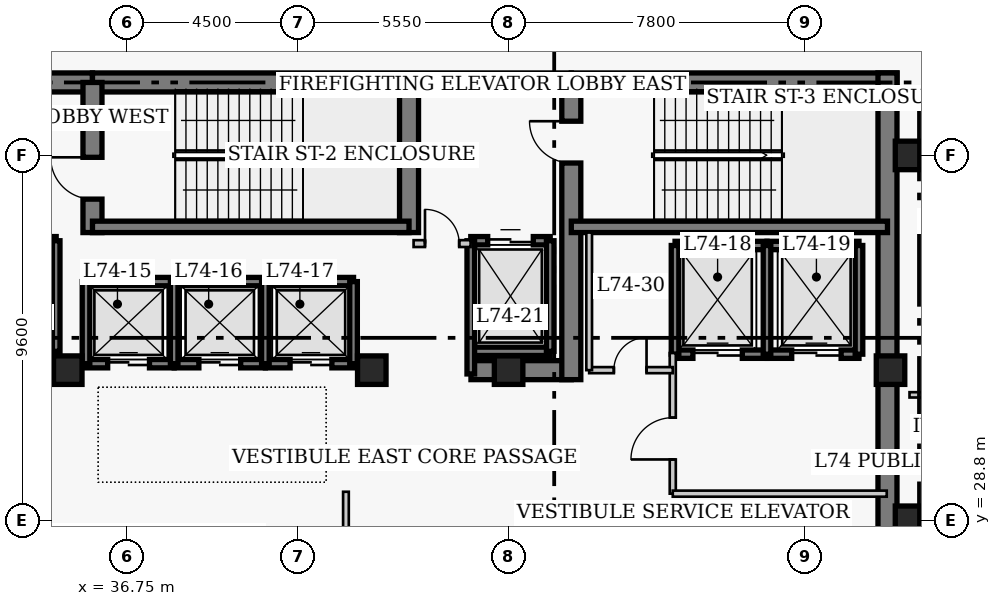
"""IFC4 building model, lengths in metres.
Left out: names, types, materials, properties, quantities, classifications, styles, units other than length and angle.
Written with IfcOpenShell. Run it as: python <this file> out.ifc"""

import sys

from ifc_helpers import new_model, si_unit, direction, frame, frame_2d, origin, origin_2d, place, context, subcontext, project, spatial, rectangle, extrude, element, fill, save


model = new_model("IFC4")
c1 = context("Model", 3, precision=1e-05, world=origin(), true_north=direction((0.0, 1.0)))
c2 = subcontext(c1, "Body", "Model", "MODEL_VIEW")
j1 = project(units=[si_unit("LENGTHUNIT", "METRE"), si_unit("PLANEANGLEUNIT", "RADIAN")], contexts=[c1])
p1 = place(None, origin())
s1 = spatial("IfcSite", under=j1, at=p1, CompositionType="ELEMENT")
p2 = place(p1, origin())
s2 = spatial("IfcBuilding", under=s1, at=p2, CompositionType="ELEMENT")
p3 = place(p2, frame((0.0, 0.0, 297.4)))
s3 = spatial("IfcBuildingStorey", under=s2, at=p3, CompositionType="ELEMENT", Elevation=297.4)
p4 = place(p3, frame((21.65, 40.32, 0.0), z_axis=(0.0, 0.0, 1.0), x_axis=(1.0, 0.0, 0.0)))
e1 = element("IfcWall", 1, at=p4, inside=s3, PredefinedType="SHEAR", context=c2, shape_type="SweptSolid", body=[
    extrude(rectangle(XDim=14.2, YDim=0.5, at=frame_2d((7.1, 0.0))), origin(), (0.0, 0.0, 1.0), 4.6),
])
p5 = place(p3, frame((35.85, 40.32, 0.0), z_axis=(0.0, 0.0, 1.0), x_axis=(1.0, 0.0, 0.0)))
e2 = element("IfcWall", 2, at=p5, inside=s3, PredefinedType="SHEAR", context=c2, shape_type="SweptSolid", body=[
    extrude(rectangle(XDim=12.6, YDim=0.5, at=frame_2d((6.3, 0.0))), origin(), (0.0, 0.0, 1.0), 4.6),
])
p6 = place(p3, frame((48.45, 40.32, 0.0), z_axis=(0.0, 0.0, 1.0), x_axis=(1.0, 0.0, 0.0)))
e3 = element("IfcWall", 3, at=p6, inside=s3, PredefinedType="SHEAR", context=c2, shape_type="SweptSolid", body=[
    extrude(rectangle(XDim=8.57, YDim=0.5, at=frame_2d((4.285, 0.0))), origin(), (0.0, 0.0, 1.0), 4.6),
])
p7 = place(p3, frame((56.77, 27.05, 0.0), z_axis=(0.0, 0.0, 1.0), x_axis=(0.0, 1.0, 0.0)))
e4 = element("IfcWall", 4, at=p7, inside=s3, PredefinedType="SHEAR", context=c2, shape_type="SweptSolid", body=[
    extrude(rectangle(XDim=13.52, YDim=0.5, at=frame_2d((6.76, 0.0))), origin(), (0.0, 0.0, 1.0), 4.6),
])
p8 = place(p3, frame((45.81, 32.75, 0.0), z_axis=(0.0, 0.0, 1.0), x_axis=(1.0, 0.0, 0.0)))
e5 = element("IfcWall", 5, at=p8, inside=s3, PredefinedType="SHEAR", context=c2, shape_type="SweptSolid", body=[
    extrude(rectangle(XDim=2.64, YDim=0.5, at=frame_2d((1.32, 0.0))), origin(), (0.0, 0.0, 1.0), 4.6),
])
p9 = place(p3, frame((35.85, 36.37, 0.0), z_axis=(0.0, 0.0, 1.0), x_axis=(0.0, 1.0, 0.0)))
e6 = element("IfcWall", 6, at=p9, inside=s3, PredefinedType="SHEAR", context=c2, shape_type="SweptSolid", body=[
    extrude(rectangle(XDim=3.95, YDim=0.5, at=frame_2d((1.975, 0.0))), origin(), (0.0, 0.0, 1.0), 4.6),
])
p10 = place(p9, frame((0.88, 0.0, 0.0)))
e7 = element("IfcOpeningElement", 7, at=p10, cuts=e6, PredefinedType="OPENING", context=c2, shape_type="SweptSolid", body=[
    extrude(rectangle(XDim=1.1, YDim=2.15, at=frame_2d((0.55, 1.075))), frame((0.0, 0.26, 0.0), z_axis=(0.0, -1.0, 0.0), x_axis=(1.0, 0.0, 0.0)), (0.0, 0.0, 1.0), 0.52),
])
p11 = place(p3, frame((44.18, 36.37, 0.0), z_axis=(0.0, 0.0, 1.0), x_axis=(0.0, 1.0, 0.0)))
e8 = element("IfcWall", 8, at=p11, inside=s3, PredefinedType="SHEAR", context=c2, shape_type="SweptSolid", body=[
    extrude(rectangle(XDim=3.95, YDim=0.5, at=frame_2d((1.975, 0.0))), origin(), (0.0, 0.0, 1.0), 4.6),
])
p12 = place(p3, frame((48.45, 32.5, 0.0), z_axis=(0.0, 0.0, 1.0), x_axis=(0.0, 1.0, 0.0)))
e9 = element("IfcWall", 9, at=p12, inside=s3, PredefinedType="SHEAR", context=c2, shape_type="SweptSolid", body=[
    extrude(rectangle(XDim=7.82, YDim=0.5, at=frame_2d((3.91, 0.0))), origin(), (0.0, 0.0, 1.0), 4.6),
])
p13 = place(p12, frame((5.7, 0.0, 0.0)))
e10 = element("IfcOpeningElement", 10, at=p13, cuts=e9, PredefinedType="OPENING", context=c2, shape_type="SweptSolid", body=[
    extrude(rectangle(XDim=1.1, YDim=2.15, at=frame_2d((0.55, 1.075))), frame((0.0, 0.26, 0.0), z_axis=(0.0, -1.0, 0.0), x_axis=(1.0, 0.0, 0.0)), (0.0, 0.0, 1.0), 0.52),
])
p14 = place(p3, frame((35.85, 36.52, 0.0), z_axis=(0.0, 0.0, 1.0), x_axis=(1.0, 0.0, 0.0)))
e11 = element("IfcWall", 11, at=p14, inside=s3, PredefinedType="SHEAR", context=c2, shape_type="SweptSolid", body=[
    extrude(rectangle(XDim=8.33, YDim=0.3, at=frame_2d((4.165, 0.0))), origin(), (0.0, 0.0, 1.0), 4.6),
])
p15 = place(p3, frame((48.45, 36.52, 0.0), z_axis=(0.0, 0.0, 1.0), x_axis=(1.0, 0.0, 0.0)))
e12 = element("IfcWall", 12, at=p15, inside=s3, PredefinedType="SHEAR", context=c2, shape_type="SweptSolid", body=[
    extrude(rectangle(XDim=8.32, YDim=0.3, at=frame_2d((4.16, 0.0))), origin(), (0.0, 0.0, 1.0), 4.6),
])
for number, where, z_axis, x_axis in (
    (13, (57.35, 28.8, 0.0), (0.0, 0.0, 1.0), (1.0, 0.0, 0.0)),
    (14, (57.35, 38.4, 0.0), (0.0, 0.0, 1.0), (1.0, 0.0, 0.0)),
    (15, (35.2, 32.75, 0.0), (0.0, 0.0, 1.0), (1.0, 0.0, 0.0)),
    (16, (43.2, 32.75, 0.0), (0.0, 0.0, 1.0), (1.0, 0.0, 0.0)),
    (17, (46.8, 32.75, 0.0), (0.0, 0.0, 1.0), (1.0, 0.0, 0.0)),
    (18, (56.85, 32.75, 0.0), (0.0, 0.0, 1.0), (1.0, 0.0, 0.0)),
):
    element("IfcColumn", number, at=place(p3, frame(where, z_axis=z_axis, x_axis=x_axis)), inside=s3, PredefinedType="COLUMN", context=c2, shape_type="SweptSolid", body=[
        extrude(rectangle(XDim=0.75, YDim=0.75, at=origin_2d()), origin(), (0.0, 0.0, 1.0), 4.6),
    ])
p16 = place(p3, frame((35.68, 35.08, 0.0), z_axis=(0.0, 0.0, 1.0), x_axis=(1.0, 0.0, 0.0)))
e19 = element("IfcWall", 19, at=p16, inside=s3, PredefinedType="SHEAR", context=c2, shape_type="SweptSolid", body=[
    extrude(rectangle(XDim=2.32, YDim=0.22, at=frame_2d((1.16, 0.0))), origin(), (0.0, 0.0, 1.0), 4.6),
])
p17 = place(p3, frame((35.68, 32.92, 0.0), z_axis=(0.0, 0.0, 1.0), x_axis=(1.0, 0.0, 0.0)))
e20 = element("IfcWall", 20, at=p17, inside=s3, PredefinedType="SHEAR", context=c2, shape_type="SweptSolid", body=[
    extrude(rectangle(XDim=2.32, YDim=0.22, at=frame_2d((1.16, 0.0))), origin(), (0.0, 0.0, 1.0), 4.6),
])
p18 = place(p17, frame((0.57, 0.0, 0.0)))
e21 = element("IfcOpeningElement", 21, at=p18, cuts=e20, PredefinedType="OPENING", context=c2, shape_type="SweptSolid", body=[
    extrude(rectangle(XDim=1.1, YDim=2.15, at=frame_2d((0.55, 1.075))), frame((0.0, 0.12, 0.0), z_axis=(0.0, -1.0, 0.0), x_axis=(1.0, 0.0, 0.0)), (0.0, 0.0, 1.0), 0.24),
])
p19 = place(p3, frame((35.68, 32.92, 0.0), z_axis=(0.0, 0.0, 1.0), x_axis=(0.0, 1.0, 0.0)))
e22 = element("IfcWall", 22, at=p19, inside=s3, PredefinedType="SHEAR", context=c2, shape_type="SweptSolid", body=[
    extrude(rectangle(XDim=2.16, YDim=0.2, at=frame_2d((1.08, 0.0))), origin(), (0.0, 0.0, 1.0), 4.6),
])
p20 = place(p3, frame((38.0, 35.08, 0.0), z_axis=(0.0, 0.0, 1.0), x_axis=(1.0, 0.0, 0.0)))
e23 = element("IfcWall", 23, at=p20, inside=s3, PredefinedType="SHEAR", context=c2, shape_type="SweptSolid", body=[
    extrude(rectangle(XDim=2.4, YDim=0.22, at=frame_2d((1.2, 0.0))), origin(), (0.0, 0.0, 1.0), 4.6),
])
p21 = place(p3, frame((38.0, 32.92, 0.0), z_axis=(0.0, 0.0, 1.0), x_axis=(1.0, 0.0, 0.0)))
e24 = element("IfcWall", 24, at=p21, inside=s3, PredefinedType="SHEAR", context=c2, shape_type="SweptSolid", body=[
    extrude(rectangle(XDim=2.4, YDim=0.22, at=frame_2d((1.2, 0.0))), origin(), (0.0, 0.0, 1.0), 4.6),
])
p22 = place(p21, frame((0.65, 0.0, 0.0)))
e25 = element("IfcOpeningElement", 25, at=p22, cuts=e24, PredefinedType="OPENING", context=c2, shape_type="SweptSolid", body=[
    extrude(rectangle(XDim=1.1, YDim=2.15, at=frame_2d((0.55, 1.075))), frame((0.0, 0.12, 0.0), z_axis=(0.0, -1.0, 0.0), x_axis=(1.0, 0.0, 0.0)), (0.0, 0.0, 1.0), 0.24),
])
p23 = place(p3, frame((38.0, 32.92, 0.0), z_axis=(0.0, 0.0, 1.0), x_axis=(0.0, 1.0, 0.0)))
e26 = element("IfcWall", 26, at=p23, inside=s3, PredefinedType="SHEAR", context=c2, shape_type="SweptSolid", body=[
    extrude(rectangle(XDim=2.16, YDim=0.2, at=frame_2d((1.08, 0.0))), origin(), (0.0, 0.0, 1.0), 4.6),
])
p24 = place(p3, frame((40.4, 35.08, 0.0), z_axis=(0.0, 0.0, 1.0), x_axis=(1.0, 0.0, 0.0)))
e27 = element("IfcWall", 27, at=p24, inside=s3, PredefinedType="SHEAR", context=c2, shape_type="SweptSolid", body=[
    extrude(rectangle(XDim=2.32, YDim=0.22, at=frame_2d((1.16, 0.0))), origin(), (0.0, 0.0, 1.0), 4.6),
])
p25 = place(p3, frame((40.4, 32.92, 0.0), z_axis=(0.0, 0.0, 1.0), x_axis=(1.0, 0.0, 0.0)))
e28 = element("IfcWall", 28, at=p25, inside=s3, PredefinedType="SHEAR", context=c2, shape_type="SweptSolid", body=[
    extrude(rectangle(XDim=2.32, YDim=0.22, at=frame_2d((1.16, 0.0))), origin(), (0.0, 0.0, 1.0), 4.6),
])
p26 = place(p25, frame((0.65, 0.0, 0.0)))
e29 = element("IfcOpeningElement", 29, at=p26, cuts=e28, PredefinedType="OPENING", context=c2, shape_type="SweptSolid", body=[
    extrude(rectangle(XDim=1.1, YDim=2.15, at=frame_2d((0.55, 1.075))), frame((0.0, 0.12, 0.0), z_axis=(0.0, -1.0, 0.0), x_axis=(1.0, 0.0, 0.0)), (0.0, 0.0, 1.0), 0.24),
])
for number, where, z_axis, x_axis in (
    (30, (40.4, 32.92, 0.0), (0.0, 0.0, 1.0), (0.0, 1.0, 0.0)),
    (31, (42.72, 32.92, 0.0), (0.0, 0.0, 1.0), (0.0, 1.0, 0.0)),
):
    element("IfcWall", number, at=place(p3, frame(where, z_axis=z_axis, x_axis=x_axis)), inside=s3, PredefinedType="SHEAR", context=c2, shape_type="SweptSolid", body=[
        extrude(rectangle(XDim=2.16, YDim=0.2, at=frame_2d((1.08, 0.0))), origin(), (0.0, 0.0, 1.0), 4.6),
    ])
p27 = place(p3, frame((51.18, 36.03, 0.0), z_axis=(0.0, 0.0, 1.0), x_axis=(1.0, 0.0, 0.0)))
e32 = element("IfcWall", 32, at=p27, inside=s3, PredefinedType="SHEAR", context=c2, shape_type="SweptSolid", body=[
    extrude(rectangle(XDim=2.42, YDim=0.22, at=frame_2d((1.21, 0.0))), origin(), (0.0, 0.0, 1.0), 4.6),
])
p28 = place(p3, frame((51.18, 33.17, 0.0), z_axis=(0.0, 0.0, 1.0), x_axis=(1.0, 0.0, 0.0)))
e33 = element("IfcWall", 33, at=p28, inside=s3, PredefinedType="SHEAR", context=c2, shape_type="SweptSolid", body=[
    extrude(rectangle(XDim=2.42, YDim=0.22, at=frame_2d((1.21, 0.0))), origin(), (0.0, 0.0, 1.0), 4.6),
])
p29 = place(p28, frame((0.47, 0.0, 0.0)))
e34 = element("IfcOpeningElement", 34, at=p29, cuts=e33, PredefinedType="OPENING", context=c2, shape_type="SweptSolid", body=[
    extrude(rectangle(XDim=1.3, YDim=2.15, at=frame_2d((0.65, 1.075))), frame((0.0, 0.12, 0.0), z_axis=(0.0, -1.0, 0.0), x_axis=(1.0, 0.0, 0.0)), (0.0, 0.0, 1.0), 0.24),
])
p30 = place(p3, frame((51.18, 33.17, 0.0), z_axis=(0.0, 0.0, 1.0), x_axis=(0.0, 1.0, 0.0)))
e35 = element("IfcWall", 35, at=p30, inside=s3, PredefinedType="SHEAR", context=c2, shape_type="SweptSolid", body=[
    extrude(rectangle(XDim=2.86, YDim=0.2, at=frame_2d((1.43, 0.0))), origin(), (0.0, 0.0, 1.0), 4.6),
])
p31 = place(p3, frame((53.6, 36.03, 0.0), z_axis=(0.0, 0.0, 1.0), x_axis=(1.0, 0.0, 0.0)))
e36 = element("IfcWall", 36, at=p31, inside=s3, PredefinedType="SHEAR", context=c2, shape_type="SweptSolid", body=[
    extrude(rectangle(XDim=2.42, YDim=0.22, at=frame_2d((1.21, 0.0))), origin(), (0.0, 0.0, 1.0), 4.6),
])
p32 = place(p3, frame((53.6, 33.17, 0.0), z_axis=(0.0, 0.0, 1.0), x_axis=(1.0, 0.0, 0.0)))
e37 = element("IfcWall", 37, at=p32, inside=s3, PredefinedType="SHEAR", context=c2, shape_type="SweptSolid", body=[
    extrude(rectangle(XDim=2.42, YDim=0.22, at=frame_2d((1.21, 0.0))), origin(), (0.0, 0.0, 1.0), 4.6),
])
p33 = place(p32, frame((0.65, 0.0, 0.0)))
e38 = element("IfcOpeningElement", 38, at=p33, cuts=e37, PredefinedType="OPENING", context=c2, shape_type="SweptSolid", body=[
    extrude(rectangle(XDim=1.3, YDim=2.15, at=frame_2d((0.65, 1.075))), frame((0.0, 0.12, 0.0), z_axis=(0.0, -1.0, 0.0), x_axis=(1.0, 0.0, 0.0)), (0.0, 0.0, 1.0), 0.24),
])
for number, where, z_axis, x_axis in (
    (39, (53.6, 33.17, 0.0), (0.0, 0.0, 1.0), (0.0, 1.0, 0.0)),
    (40, (56.02, 33.17, 0.0), (0.0, 0.0, 1.0), (0.0, 1.0, 0.0)),
):
    element("IfcWall", number, at=place(p3, frame(where, z_axis=z_axis, x_axis=x_axis)), inside=s3, PredefinedType="SHEAR", context=c2, shape_type="SweptSolid", body=[
        extrude(rectangle(XDim=2.86, YDim=0.2, at=frame_2d((1.43, 0.0))), origin(), (0.0, 0.0, 1.0), 4.6),
    ])
p34 = place(p3, frame((32.805, 36.155, 0.0), z_axis=(0.0, 0.0, 1.0), x_axis=(1.0, 0.0, 0.0)))
e41 = element("IfcWall", 41, at=p34, inside=s3, PredefinedType="SHEAR", context=c2, shape_type="SweptSolid", body=[
    extrude(rectangle(XDim=2.09, YDim=0.22, at=frame_2d((1.045, 0.0))), origin(), (0.0, 0.0, 1.0), 4.6),
])
p35 = place(p34, frame((0.445, 0.0, 0.0)))
e42 = element("IfcOpeningElement", 42, at=p35, cuts=e41, PredefinedType="OPENING", context=c2, shape_type="SweptSolid", body=[
    extrude(rectangle(XDim=1.2, YDim=2.15, at=frame_2d((0.6, 1.075))), frame((0.0, 0.12, 0.0), z_axis=(0.0, -1.0, 0.0), x_axis=(1.0, 0.0, 0.0)), (0.0, 0.0, 1.0), 0.24),
])
p36 = place(p3, frame((32.805, 33.245, 0.0), z_axis=(0.0, 0.0, 1.0), x_axis=(1.0, 0.0, 0.0)))
e43 = element("IfcWall", 43, at=p36, inside=s3, PredefinedType="SHEAR", context=c2, shape_type="SweptSolid", body=[
    extrude(rectangle(XDim=2.09, YDim=0.22, at=frame_2d((1.045, 0.0))), origin(), (0.0, 0.0, 1.0), 4.6),
])
p37 = place(p3, frame((34.895, 33.245, 0.0), z_axis=(0.0, 0.0, 1.0), x_axis=(0.0, 1.0, 0.0)))
e44 = element("IfcWall", 44, at=p37, inside=s3, PredefinedType="SHEAR", context=c2, shape_type="SweptSolid", body=[
    extrude(rectangle(XDim=2.91, YDim=0.2, at=frame_2d((1.455, 0.0))), origin(), (0.0, 0.0, 1.0), 4.6),
])
p38 = place(p3, frame((45.805, 36.155, 0.0), z_axis=(0.0, 0.0, 1.0), x_axis=(1.0, 0.0, 0.0)))
e45 = element("IfcWall", 45, at=p38, inside=s3, PredefinedType="SHEAR", context=c2, shape_type="SweptSolid", body=[
    extrude(rectangle(XDim=2.09, YDim=0.22, at=frame_2d((1.045, 0.0))), origin(), (0.0, 0.0, 1.0), 4.6),
])
p39 = place(p38, frame((0.445, 0.0, 0.0)))
e46 = element("IfcOpeningElement", 46, at=p39, cuts=e45, PredefinedType="OPENING", context=c2, shape_type="SweptSolid", body=[
    extrude(rectangle(XDim=1.2, YDim=2.15, at=frame_2d((0.6, 1.075))), frame((0.0, 0.12, 0.0), z_axis=(0.0, -1.0, 0.0), x_axis=(1.0, 0.0, 0.0)), (0.0, 0.0, 1.0), 0.24),
])
p40 = place(p3, frame((45.805, 33.245, 0.0), z_axis=(0.0, 0.0, 1.0), x_axis=(1.0, 0.0, 0.0)))
e47 = element("IfcWall", 47, at=p40, inside=s3, PredefinedType="SHEAR", context=c2, shape_type="SweptSolid", body=[
    extrude(rectangle(XDim=2.09, YDim=0.22, at=frame_2d((1.045, 0.0))), origin(), (0.0, 0.0, 1.0), 4.6),
])
p41 = place(p3, frame((45.805, 32.65, 0.0), z_axis=(0.0, 0.0, 1.0), x_axis=(0.0, 1.0, 0.0)))
e48 = element("IfcWall", 48, at=p41, inside=s3, PredefinedType="SHEAR", context=c2, shape_type="SweptSolid", body=[
    extrude(rectangle(XDim=3.505, YDim=0.2, at=frame_2d((1.752, 0.0))), origin(), (0.0, 0.0, 1.0), 4.6),
])
p42 = place(p3, frame((47.895, 33.245, 0.0), z_axis=(0.0, 0.0, 1.0), x_axis=(0.0, 1.0, 0.0)))
e49 = element("IfcWall", 49, at=p42, inside=s3, PredefinedType="SHEAR", context=c2, shape_type="SweptSolid", body=[
    extrude(rectangle(XDim=2.91, YDim=0.2, at=frame_2d((1.455, 0.0))), origin(), (0.0, 0.0, 1.0), 4.6),
])
p43 = place(p3, frame((44.3, 36.08, 0.0), z_axis=(0.0, 0.0, 1.0), x_axis=(1.0, 0.0, 0.0)))
e50 = element("IfcWall", 50, at=p43, inside=s3, PredefinedType="PARTITIONING", context=c2, shape_type="SweptSolid", body=[
    extrude(rectangle(XDim=1.5, YDim=0.18, at=frame_2d((0.75, 0.0))), origin(), (0.0, 0.0, 1.0), 4.31),
])
p44 = place(p43, frame((0.3, 0.0, 0.0)))
e51 = element("IfcOpeningElement", 51, at=p44, cuts=e50, PredefinedType="OPENING", context=c2, shape_type="SweptSolid", body=[
    extrude(rectangle(XDim=0.9, YDim=2.15, at=frame_2d((0.45, 1.075))), frame((0.0, 0.1, 0.0), z_axis=(0.0, -1.0, 0.0), x_axis=(1.0, 0.0, 0.0)), (0.0, 0.0, 1.0), 0.2),
])
p45 = place(p3, frame((51.12, 29.5, 0.0), z_axis=(0.0, 0.0, 1.0), x_axis=(0.0, 1.0, 0.0)))
e52 = element("IfcWall", 52, at=p45, inside=s3, PredefinedType="PARTITIONING", context=c2, shape_type="SweptSolid", body=[
    extrude(rectangle(XDim=3.7, YDim=0.16, at=frame_2d((1.85, 0.0))), origin(), (0.0, 0.0, 1.0), 4.31),
])
p46 = place(p45, frame((0.9, 0.0, 0.0)))
e53 = element("IfcOpeningElement", 53, at=p46, cuts=e52, PredefinedType="OPENING", context=c2, shape_type="SweptSolid", body=[
    extrude(rectangle(XDim=1.1, YDim=2.15, at=frame_2d((0.55, 1.075))), frame((0.0, 0.09, 0.0), z_axis=(0.0, -1.0, 0.0), x_axis=(1.0, 0.0, 0.0)), (0.0, 0.0, 1.0), 0.18),
])
p47 = place(p3, frame((51.12, 29.5, 0.0), z_axis=(0.0, 0.0, 1.0), x_axis=(1.0, 0.0, 0.0)))
e54 = element("IfcWall", 54, at=p47, inside=s3, PredefinedType="PARTITIONING", context=c2, shape_type="SweptSolid", body=[
    extrude(rectangle(XDim=5.63, YDim=0.16, at=frame_2d((2.815, 0.0))), origin(), (0.0, 0.0, 1.0), 4.31),
])
p48 = place(p3, frame((48.92, 32.75, 0.0), z_axis=(0.0, 0.0, 1.0), x_axis=(1.0, 0.0, 0.0)))
e55 = element("IfcWall", 55, at=p48, inside=s3, PredefinedType="PARTITIONING", context=c2, shape_type="SweptSolid", body=[
    extrude(rectangle(XDim=2.2, YDim=0.16, at=frame_2d((1.1, 0.0))), origin(), (0.0, 0.0, 1.0), 4.31),
])
p49 = place(p48, frame((0.65, 0.0, 0.0)))
e56 = element("IfcOpeningElement", 56, at=p49, cuts=e55, PredefinedType="OPENING", context=c2, shape_type="SweptSolid", body=[
    extrude(rectangle(XDim=0.86, YDim=2.05, at=frame_2d((0.43, 1.025))), frame((0.0, 0.09, 0.0), z_axis=(0.0, -1.0, 0.0), x_axis=(1.0, 0.0, 0.0)), (0.0, 0.0, 1.0), 0.18),
])
p50 = place(p3, frame((48.92, 32.75, 0.0), z_axis=(0.0, 0.0, 1.0), x_axis=(0.0, 1.0, 0.0)))
e57 = element("IfcWall", 57, at=p50, inside=s3, PredefinedType="PARTITIONING", context=c2, shape_type="SweptSolid", body=[
    extrude(rectangle(XDim=3.62, YDim=0.15, at=frame_2d((1.81, 0.0))), origin(), (0.0, 0.0, 1.0), 4.31),
])
p51 = place(p3, frame((42.52, 24.78, 0.0), z_axis=(0.0, 0.0, 1.0), x_axis=(0.0, 1.0, 0.0)))
e58 = element("IfcWall", 58, at=p51, inside=s3, PredefinedType="PARTITIONING", context=c2, shape_type="SweptSolid", body=[
    extrude(rectangle(XDim=4.77, YDim=0.15, at=frame_2d((2.385, 0.0))), origin(), (0.0, 0.0, 1.0), 4.31),
])
p52 = place(p3, frame((57.35, 32.1, 0.0), z_axis=(0.0, 0.0, 1.0), x_axis=(1.0, 0.0, 0.0)))
e59 = element("IfcWall", 59, at=p52, inside=s3, PredefinedType="PLUMBINGWALL", context=c2, shape_type="SweptSolid", body=[
    extrude(rectangle(XDim=3.23, YDim=0.14, at=frame_2d((1.615, 0.0))), origin(), (0.0, 0.0, 1.0), 4.31),
])
p53 = place(p18, origin())
e60 = element("IfcDoor", 60, at=p53, inside=s3, OperationType="DOUBLE_DOOR_SLIDING", PredefinedType="DOOR", context=c2, shape_type="SweptSolid", body=[
    extrude(rectangle(XDim=1.1, YDim=2.15, at=frame_2d((0.55, 1.075))), frame((0.0, 0.025, 0.0), z_axis=(0.0, -1.0, 0.0), x_axis=(1.0, 0.0, 0.0)), (0.0, 0.0, 1.0), 0.05),
])
fill(e21, e60)
p54 = place(p22, origin())
e61 = element("IfcDoor", 61, at=p54, inside=s3, OperationType="DOUBLE_DOOR_SLIDING", PredefinedType="DOOR", context=c2, shape_type="SweptSolid", body=[
    extrude(rectangle(XDim=1.1, YDim=2.15, at=frame_2d((0.55, 1.075))), frame((0.0, 0.025, 0.0), z_axis=(0.0, -1.0, 0.0), x_axis=(1.0, 0.0, 0.0)), (0.0, 0.0, 1.0), 0.05),
])
fill(e25, e61)
p55 = place(p26, origin())
e62 = element("IfcDoor", 62, at=p55, inside=s3, OperationType="DOUBLE_DOOR_SLIDING", PredefinedType="DOOR", context=c2, shape_type="SweptSolid", body=[
    extrude(rectangle(XDim=1.1, YDim=2.15, at=frame_2d((0.55, 1.075))), frame((0.0, 0.025, 0.0), z_axis=(0.0, -1.0, 0.0), x_axis=(1.0, 0.0, 0.0)), (0.0, 0.0, 1.0), 0.05),
])
fill(e29, e62)
p56 = place(p29, origin())
e63 = element("IfcDoor", 63, at=p56, inside=s3, OperationType="DOUBLE_DOOR_SLIDING", PredefinedType="DOOR", context=c2, shape_type="SweptSolid", body=[
    extrude(rectangle(XDim=1.3, YDim=2.15, at=frame_2d((0.65, 1.075))), frame((0.0, 0.025, 0.0), z_axis=(0.0, -1.0, 0.0), x_axis=(1.0, 0.0, 0.0)), (0.0, 0.0, 1.0), 0.05),
])
fill(e34, e63)
p57 = place(p33, origin())
e64 = element("IfcDoor", 64, at=p57, inside=s3, OperationType="DOUBLE_DOOR_SLIDING", PredefinedType="DOOR", context=c2, shape_type="SweptSolid", body=[
    extrude(rectangle(XDim=1.3, YDim=2.15, at=frame_2d((0.65, 1.075))), frame((0.0, 0.025, 0.0), z_axis=(0.0, -1.0, 0.0), x_axis=(1.0, 0.0, 0.0)), (0.0, 0.0, 1.0), 0.05),
])
fill(e38, e64)
p58 = place(p39, origin())
e65 = element("IfcDoor", 65, at=p58, inside=s3, OperationType="DOUBLE_DOOR_SLIDING", PredefinedType="DOOR", context=c2, shape_type="SweptSolid", body=[
    extrude(rectangle(XDim=1.2, YDim=2.15, at=frame_2d((0.6, 1.075))), frame((0.0, 0.025, 0.0), z_axis=(0.0, -1.0, 0.0), x_axis=(1.0, 0.0, 0.0)), (0.0, 0.0, 1.0), 0.05),
])
fill(e46, e65)
p59 = place(p44, origin())
e66 = element("IfcDoor", 66, at=p59, inside=s3, OperationType="SINGLE_SWING_LEFT", PredefinedType="DOOR", context=c2, shape_type="SweptSolid", body=[
    extrude(rectangle(XDim=0.9, YDim=2.15, at=frame_2d((0.45, 1.075))), frame((0.0, 0.025, 0.0), z_axis=(0.0, -1.0, 0.0), x_axis=(1.0, 0.0, 0.0)), (0.0, 0.0, 1.0), 0.05),
])
fill(e51, e66)
p60 = place(p46, origin())
e67 = element("IfcDoor", 67, at=p60, inside=s3, OperationType="SINGLE_SWING_LEFT", PredefinedType="DOOR", context=c2, shape_type="SweptSolid", body=[
    extrude(rectangle(XDim=1.1, YDim=2.15, at=frame_2d((0.55, 1.075))), frame((0.0, 0.025, 0.0), z_axis=(0.0, -1.0, 0.0), x_axis=(1.0, 0.0, 0.0)), (0.0, 0.0, 1.0), 0.05),
])
fill(e53, e67)
p61 = place(p49, origin())
e68 = element("IfcDoor", 68, at=p61, inside=s3, OperationType="SINGLE_SWING_RIGHT", PredefinedType="DOOR", context=c2, shape_type="SweptSolid", body=[
    extrude(rectangle(XDim=0.86, YDim=2.05, at=frame_2d((0.43, 1.025))), frame((0.0, 0.025, 0.0), z_axis=(0.0, -1.0, 0.0), x_axis=(1.0, 0.0, 0.0)), (0.0, 0.0, 1.0), 0.05),
])
fill(e56, e68)
p62 = place(p10, origin())
e69 = element("IfcDoor", 69, at=p62, inside=s3, OperationType="SINGLE_SWING_RIGHT", PredefinedType="DOOR", context=c2, shape_type="SweptSolid", body=[
    extrude(rectangle(XDim=1.1, YDim=2.15, at=frame_2d((0.55, 1.075))), frame((0.0, 0.025, 0.0), z_axis=(0.0, -1.0, 0.0), x_axis=(1.0, 0.0, 0.0)), (0.0, 0.0, 1.0), 0.05),
])
fill(e7, e69)
p63 = place(p13, origin())
e70 = element("IfcDoor", 70, at=p63, inside=s3, OperationType="SINGLE_SWING_RIGHT", PredefinedType="DOOR", context=c2, shape_type="SweptSolid", body=[
    extrude(rectangle(XDim=1.1, YDim=2.15, at=frame_2d((0.55, 1.075))), frame((0.0, 0.025, 0.0), z_axis=(0.0, -1.0, 0.0), x_axis=(1.0, 0.0, 0.0)), (0.0, 0.0, 1.0), 0.05),
])
fill(e10, e70)
save(model, sys.argv[1])
